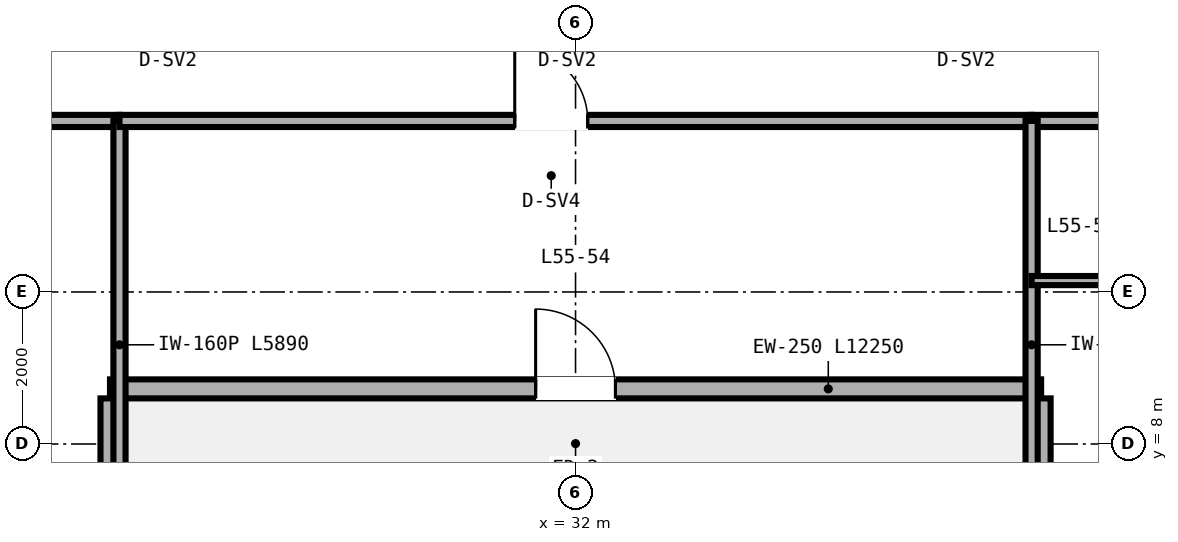
"""IFC4 building model, lengths in metres.
Left out: names, types, materials, properties, quantities, classifications, styles, units other than length and angle.
Written with IfcOpenShell. Run it as: python <this file> out.ifc"""

import sys

from ifc_helpers import new_model, si_unit, direction, frame, frame_2d, origin, place, context, subcontext, project, spatial, rectangle, extrude, source, transform, mapped, element, fill, save


model = new_model("IFC4")
c1 = context("Model", 3, precision=1e-05, world=origin(), true_north=direction((0.0, 1.0)))
c2 = subcontext(c1, "Body", "Model", "MODEL_VIEW")
j1 = project(units=[si_unit("LENGTHUNIT", "METRE"), si_unit("PLANEANGLEUNIT", "RADIAN")], contexts=[c1])
p1 = place(None, origin())
s1 = spatial("IfcSite", under=j1, at=p1, CompositionType="ELEMENT")
p2 = place(p1, origin())
s2 = spatial("IfcBuilding", under=s1, at=p2, CompositionType="ELEMENT")
p3 = place(p2, frame((0.0, 0.0, 217.2)))
s3 = spatial("IfcBuildingStorey", under=s2, at=p3, CompositionType="ELEMENT", Elevation=217.2)
p4 = place(p3, frame((25.875, 8.725, 0.0), z_axis=(0.0, 0.0, 1.0), x_axis=(1.0, 0.0, 0.0)))
e1 = element("IfcWall", 1, at=p4, inside=s3, PredefinedType="SOLIDWALL", context=c2, shape_type="SweptSolid", body=[
    extrude(rectangle(XDim=12.25, YDim=0.25, at=frame_2d((6.125, 0.0))), origin(), (0.0, 0.0, 1.0), 3.28),
])
p5 = place(p4, frame((5.6, 0.0, 0.0)))
e2 = element("IfcOpeningElement", 2, at=p5, cuts=e1, PredefinedType="OPENING", context=c2, shape_type="SweptSolid", body=[
    extrude(rectangle(XDim=1.05, YDim=2.15, at=frame_2d((0.525, 1.075))), frame((0.0, 0.135, 0.0), z_axis=(0.0, -1.0, 0.0), x_axis=(1.0, 0.0, 0.0)), (0.0, 0.0, 1.0), 0.27),
])
for number, where, z_axis, x_axis in (
    (3, (25.875, 6.1, 0.0), (0.0, 0.0, 1.0), (0.0, 1.0, 0.0)),
    (4, (38.125, 6.1, 0.0), (0.0, 0.0, 1.0), (0.0, 1.0, 0.0)),
):
    element("IfcWall", number, at=place(p3, frame(where, z_axis=z_axis, x_axis=x_axis)), inside=s3, PredefinedType="SOLIDWALL", context=c2, shape_type="SweptSolid", body=[
        extrude(rectangle(XDim=2.5, YDim=0.25, at=frame_2d((1.25, 0.0))), origin(), (0.0, 0.0, 1.0), 2.353),
    ])
p6 = place(p3, frame((14.0, 12.25, 0.0), z_axis=(0.0, 0.0, 1.0), x_axis=(1.0, 0.0, 0.0)))
e5 = element("IfcWall", 5, at=p6, inside=s3, PredefinedType="PARTITIONING", context=c2, shape_type="SweptSolid", body=[
    extrude(rectangle(XDim=12.0, YDim=0.16, at=frame_2d((6.0, 0.0))), origin(), (0.0, 0.0, 1.0), 2.823),
])
p7 = place(p6, frame((4.74, 0.0, 0.0)))
e6 = element("IfcOpeningElement", 6, at=p7, cuts=e5, PredefinedType="OPENING", context=c2, shape_type="SweptSolid", body=[
    extrude(rectangle(XDim=0.94, YDim=2.15, at=frame_2d((0.47, 1.075))), frame((0.0, 0.09, 0.0), z_axis=(0.0, -1.0, 0.0), x_axis=(1.0, 0.0, 0.0)), (0.0, 0.0, 1.0), 0.18),
])
p8 = place(p6, frame((8.52, 0.0, 0.0)))
e7 = element("IfcOpeningElement", 7, at=p8, cuts=e5, PredefinedType="OPENING", context=c2, shape_type="SweptSolid", body=[
    extrude(rectangle(XDim=0.96, YDim=2.15, at=frame_2d((0.48, 1.075))), frame((0.0, 0.09, 0.0), z_axis=(0.0, -1.0, 0.0), x_axis=(1.0, 0.0, 0.0)), (0.0, 0.0, 1.0), 0.18),
])
p9 = place(p3, frame((26.0, 6.36, 0.0), z_axis=(0.0, 0.0, 1.0), x_axis=(0.0, 1.0, 0.0)))
e8 = element("IfcWall", 8, at=p9, inside=s3, PredefinedType="PARTITIONING", context=c2, shape_type="SweptSolid", body=[
    extrude(rectangle(XDim=5.89, YDim=0.16, at=frame_2d((2.945, 0.0))), origin(), (0.0, 0.0, 1.0), 2.36),
])
p10 = place(p3, frame((26.0, 12.25, 0.0), z_axis=(0.0, 0.0, 1.0), x_axis=(1.0, 0.0, 0.0)))
e9 = element("IfcWall", 9, at=p10, inside=s3, PredefinedType="PARTITIONING", context=c2, shape_type="SweptSolid", body=[
    extrude(rectangle(XDim=12.0, YDim=0.16, at=frame_2d((6.0, 0.0))), origin(), (0.0, 0.0, 1.0), 3.28),
])
p11 = place(p10, frame((5.2, 0.0, 0.0)))
e10 = element("IfcOpeningElement", 10, at=p11, cuts=e9, PredefinedType="OPENING", context=c2, shape_type="SweptSolid", body=[
    extrude(rectangle(XDim=0.96, YDim=2.15, at=frame_2d((0.48, 1.075))), frame((0.0, 0.09, 0.0), z_axis=(0.0, -1.0, 0.0), x_axis=(1.0, 0.0, 0.0)), (0.0, 0.0, 1.0), 0.18),
])
p12 = place(p3, frame((38.0, 12.25, 0.0), z_axis=(0.0, 0.0, 1.0), x_axis=(1.0, 0.0, 0.0)))
e11 = element("IfcWall", 11, at=p12, inside=s3, PredefinedType="PARTITIONING", context=c2, shape_type="SweptSolid", body=[
    extrude(rectangle(XDim=12.0, YDim=0.16, at=frame_2d((6.0, 0.0))), origin(), (0.0, 0.0, 1.0), 2.823),
])
p13 = place(p12, frame((5.24, 0.0, 0.0)))
e12 = element("IfcOpeningElement", 12, at=p13, cuts=e11, PredefinedType="OPENING", context=c2, shape_type="SweptSolid", body=[
    extrude(rectangle(XDim=0.94, YDim=2.15, at=frame_2d((0.47, 1.075))), frame((0.0, 0.09, 0.0), z_axis=(0.0, -1.0, 0.0), x_axis=(1.0, 0.0, 0.0)), (0.0, 0.0, 1.0), 0.18),
])
p14 = place(p12, frame((10.74, 0.0, 0.0)))
e13 = element("IfcOpeningElement", 13, at=p14, cuts=e11, PredefinedType="OPENING", context=c2, shape_type="SweptSolid", body=[
    extrude(rectangle(XDim=0.94, YDim=2.15, at=frame_2d((0.47, 1.075))), frame((0.0, 0.09, 0.0), z_axis=(0.0, -1.0, 0.0), x_axis=(1.0, 0.0, 0.0)), (0.0, 0.0, 1.0), 0.18),
])
p15 = place(p3, frame((38.0, 6.36, 0.0), z_axis=(0.0, 0.0, 1.0), x_axis=(0.0, 1.0, 0.0)))
e14 = element("IfcWall", 14, at=p15, inside=s3, PredefinedType="PARTITIONING", context=c2, shape_type="SweptSolid", body=[
    extrude(rectangle(XDim=5.89, YDim=0.16, at=frame_2d((2.945, 0.0))), origin(), (0.0, 0.0, 1.0), 2.36),
])
p16 = place(p3, frame((38.0, 10.15, 0.0), z_axis=(0.0, 0.0, 1.0), x_axis=(1.0, 0.0, 0.0)))
e15 = element("IfcWall", 15, at=p16, inside=s3, PredefinedType="PARTITIONING", context=c2, shape_type="SweptSolid", body=[
    extrude(rectangle(XDim=1.95, YDim=0.12, at=frame_2d((0.975, 0.0))), origin(), (0.0, 0.0, 1.0), 3.28),
])
m1 = source(origin(), c2, "Body", "SweptSolid", [
    extrude(rectangle(XDim=1.05, YDim=2.15, at=frame_2d((0.525, 1.075))), frame((0.0, 0.025, 0.0), z_axis=(0.0, -1.0, 0.0), x_axis=(1.0, 0.0, 0.0)), (0.0, 0.0, 1.0), 0.05),
])
p17 = place(p5, origin())
e16 = element("IfcDoor", 16, at=p17, inside=s3, OperationType="SINGLE_SWING_LEFT", PredefinedType="DOOR", context=c2, shape_type="MappedRepresentation", body=[
    mapped(m1, transform((0.0, 0.0, 0.0), scale=1.0)),
])
fill(e2, e16)
m2 = source(origin(), c2, "Body", "SweptSolid", [
    extrude(rectangle(XDim=0.96, YDim=2.15, at=frame_2d((0.48, 1.075))), frame((0.0, 0.025, 0.0), z_axis=(0.0, -1.0, 0.0), x_axis=(1.0, 0.0, 0.0)), (0.0, 0.0, 1.0), 0.05),
])
p18 = place(p11, origin())
e17 = element("IfcDoor", 17, at=p18, inside=s3, OperationType="SINGLE_SWING_LEFT", PredefinedType="DOOR", context=c2, shape_type="MappedRepresentation", body=[
    mapped(m2, transform((0.0, 0.0, 0.0), scale=1.0)),
])
fill(e10, e17)
save(model, sys.argv[1])
